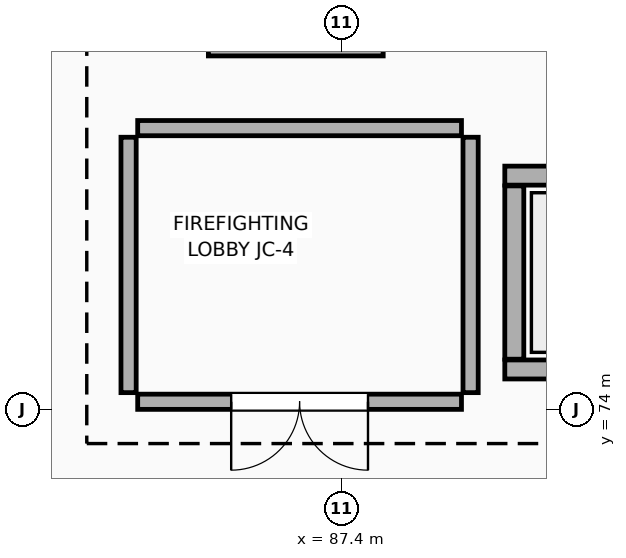
"""IFC4 building model, lengths in metres.
Left out: names, types, materials, properties, quantities, classifications, styles, units other than length and angle.
Written with IfcOpenShell. Run it as: python <this file> out.ifc"""

import sys

from ifc_helpers import new_model, si_unit, direction, frame, frame_2d, origin, place, context, subcontext, project, spatial, rectangle, extrude, element, fill, save


model = new_model("IFC4")
c1 = context("Model", 3, precision=1e-05, world=origin(), true_north=direction((0.0, 1.0)))
c2 = subcontext(c1, "Body", "Model", "MODEL_VIEW")
j1 = project(units=[si_unit("LENGTHUNIT", "METRE"), si_unit("PLANEANGLEUNIT", "RADIAN")], contexts=[c1])
p1 = place(None, origin())
s1 = spatial("IfcSite", under=j1, at=p1, CompositionType="ELEMENT")
p2 = place(p1, origin())
s2 = spatial("IfcBuilding", under=s1, at=p2, CompositionType="ELEMENT")
p3 = place(p2, frame((0.0, 0.0, -4.8)))
s3 = spatial("IfcBuildingStorey", under=s2, at=p3, CompositionType="ELEMENT", Elevation=-4.8)
p4 = place(p3, frame((89.55, 74.525, 0.0), z_axis=(0.0, 0.0, 1.0), x_axis=(1.0, 0.0, 0.0)))
e1 = element("IfcWall", 1, at=p4, inside=s3, PredefinedType="STANDARD", context=c2, shape_type="SweptSolid", body=[
    extrude(rectangle(XDim=2.5, YDim=0.25, at=frame_2d((1.25, 0.0))), origin(), (0.0, 0.0, 1.0), 4.47),
])
p5 = place(p4, frame((0.65, 0.0, 0.0)))
e2 = element("IfcOpeningElement", 2, at=p5, cuts=e1, PredefinedType="OPENING", context=c2, shape_type="SweptSolid", body=[
    extrude(rectangle(XDim=1.2, YDim=2.05, at=frame_2d((0.6, 1.025))), frame((0.0, 0.135, 0.0), z_axis=(0.0, -1.0, 0.0), x_axis=(1.0, 0.0, 0.0)), (0.0, 0.0, 1.0), 0.27),
])
p6 = place(p3, frame((92.05, 77.075, 0.0), z_axis=(0.0, 0.0, 1.0), x_axis=(-1.0, 0.0, 0.0)))
e3 = element("IfcWall", 3, at=p6, inside=s3, PredefinedType="STANDARD", context=c2, shape_type="SweptSolid", body=[
    extrude(rectangle(XDim=2.5, YDim=0.25, at=frame_2d((1.25, 0.0))), origin(), (0.0, 0.0, 1.0), 4.47),
])
p7 = place(p3, frame((89.675, 76.94, 0.0), z_axis=(0.0, 0.0, 1.0), x_axis=(0.0, -1.0, 0.0)))
e4 = element("IfcWall", 4, at=p7, inside=s3, PredefinedType="STANDARD", context=c2, shape_type="SweptSolid", body=[
    extrude(rectangle(XDim=2.28, YDim=0.25, at=frame_2d((1.14, 0.0))), origin(), (0.0, 0.0, 1.0), 4.47),
])
p8 = place(p3, frame((85.65, 78.775, 0.0), z_axis=(0.0, 0.0, 1.0), x_axis=(1.0, 0.0, 0.0)))
e5 = element("IfcWall", 5, at=p8, inside=s3, PredefinedType="STANDARD", context=c2, shape_type="SweptSolid", body=[
    extrude(rectangle(XDim=2.3, YDim=0.25, at=frame_2d((1.15, 0.0))), origin(), (0.0, 0.0, 1.0), 4.47),
])
p9 = place(p3, frame((84.6, 74.22, 0.0), z_axis=(0.0, 0.0, 1.0), x_axis=(0.0, 1.0, 0.0)))
e6 = element("IfcWall", 6, at=p9, inside=s3, PredefinedType="PARTITIONING", context=c2, shape_type="SweptSolid", body=[
    extrude(rectangle(XDim=3.36, YDim=0.2, at=frame_2d((1.68, 0.0))), origin(), (0.0, 0.0, 1.0), 4.47),
])
p10 = place(p3, frame((84.72, 77.7, 0.0), z_axis=(0.0, 0.0, 1.0), x_axis=(1.0, 0.0, 0.0)))
e7 = element("IfcWall", 7, at=p10, inside=s3, PredefinedType="PARTITIONING", context=c2, shape_type="SweptSolid", body=[
    extrude(rectangle(XDim=4.26, YDim=0.2, at=frame_2d((2.13, 0.0))), origin(), (0.0, 0.0, 1.0), 4.47),
])
p11 = place(p3, frame((89.1, 77.58, 0.0), z_axis=(0.0, 0.0, 1.0), x_axis=(0.0, -1.0, 0.0)))
e8 = element("IfcWall", 8, at=p11, inside=s3, PredefinedType="PARTITIONING", context=c2, shape_type="SweptSolid", body=[
    extrude(rectangle(XDim=3.36, YDim=0.2, at=frame_2d((1.68, 0.0))), origin(), (0.0, 0.0, 1.0), 4.47),
])
p12 = place(p3, frame((88.98, 74.1, 0.0), z_axis=(0.0, 0.0, 1.0), x_axis=(-1.0, 0.0, 0.0)))
e9 = element("IfcWall", 9, at=p12, inside=s3, PredefinedType="PARTITIONING", context=c2, shape_type="SweptSolid", body=[
    extrude(rectangle(XDim=4.26, YDim=0.2, at=frame_2d((2.13, 0.0))), origin(), (0.0, 0.0, 1.0), 4.39),
])
p13 = place(p12, frame((1.23, 0.0, 0.0)))
e10 = element("IfcOpeningElement", 10, at=p13, cuts=e9, PredefinedType="OPENING", context=c2, shape_type="SweptSolid", body=[
    extrude(rectangle(XDim=1.8, YDim=2.15, at=frame_2d((0.9, 1.075))), frame((0.0, 0.11, 0.0), z_axis=(0.0, -1.0, 0.0), x_axis=(1.0, 0.0, 0.0)), (0.0, 0.0, 1.0), 0.22),
])
p14 = place(p13, origin())
e11 = element("IfcDoor", 11, at=p14, inside=s3, OperationType="DOUBLE_DOOR_SINGLE_SWING", PredefinedType="DOOR", context=c2, shape_type="SweptSolid", body=[
    extrude(rectangle(XDim=1.8, YDim=2.15, at=frame_2d((0.9, 1.075))), frame((0.0, 0.025, 0.0), z_axis=(0.0, -1.0, 0.0), x_axis=(1.0, 0.0, 0.0)), (0.0, 0.0, 1.0), 0.05),
])
fill(e10, e11)
save(model, sys.argv[1])
